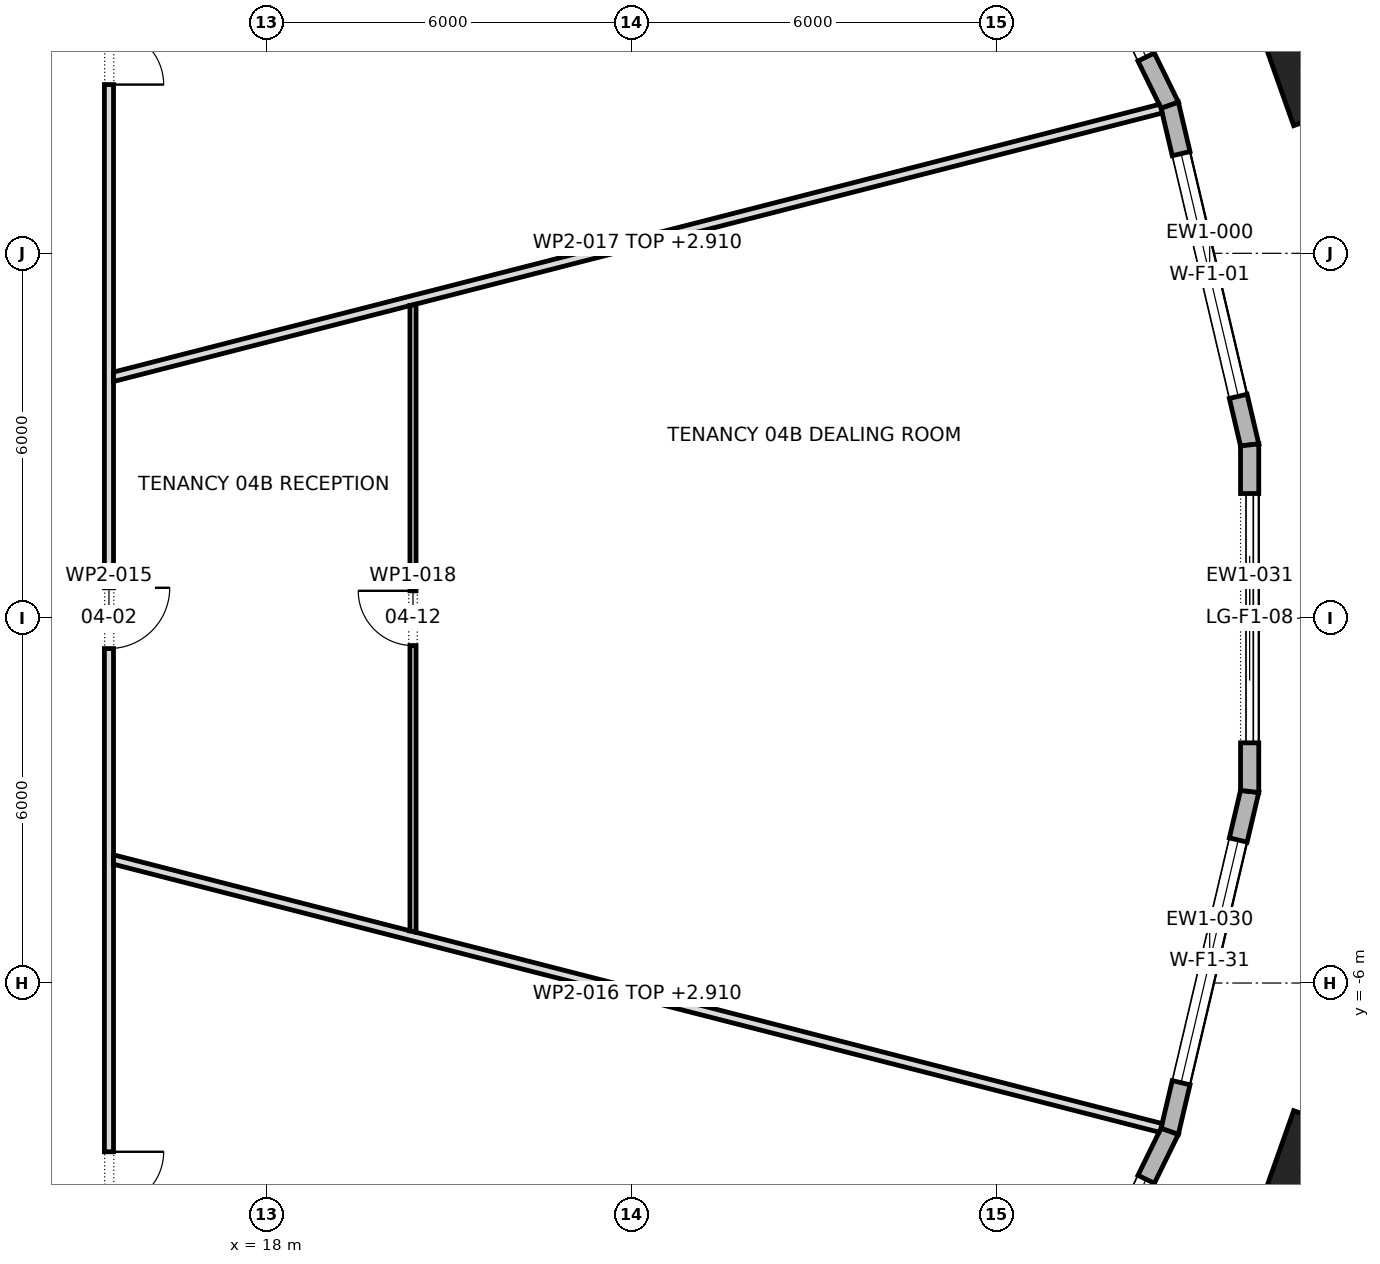
"""IFC4 building model, lengths in metres.
Left out: names, types, materials, properties, quantities, classifications, styles, units other than length and angle.
Written with IfcOpenShell. Run it as: python <this file> out.ifc"""

import sys

from ifc_helpers import new_model, si_unit, direction, frame, frame_2d, origin, origin_2d, place, context, subcontext, project, spatial, polyline, rectangle, outline, extrude, element, fill, save


model = new_model("IFC4")
c1 = context("Model", 3, precision=1e-05, world=origin(), true_north=direction((0.0, 1.0)))
c2 = subcontext(c1, "Body", "Model", "MODEL_VIEW")
j1 = project(units=[si_unit("LENGTHUNIT", "METRE"), si_unit("PLANEANGLEUNIT", "RADIAN")], contexts=[c1])
p1 = place(None, origin())
s1 = spatial("IfcSite", under=j1, at=p1, CompositionType="ELEMENT")
p2 = place(p1, origin())
s2 = spatial("IfcBuilding", under=s1, at=p2, CompositionType="ELEMENT")
p3 = place(p2, frame((0.0, 0.0, 69.7)))
s3 = spatial("IfcBuildingStorey", under=s2, at=p3, CompositionType="ELEMENT", Elevation=69.7)
for number, where, z_axis, x_axis in (
    (1, (35.054, 9.115, 0.0), (0.0, 0.0, 1.0), (-0.334, 0.943, 0.0)),
    (2, (35.054, -9.115, 0.0), (0.0, 0.0, 1.0), (0.334, 0.943, 0.0)),
):
    element("IfcColumn", number, at=place(p3, frame(where, z_axis=z_axis, x_axis=x_axis)), inside=s3, PredefinedType="COLUMN", context=c2, shape_type="SweptSolid", body=[
        extrude(rectangle(XDim=1.8, YDim=1.0, at=origin_2d()), origin(), (0.0, 0.0, 1.0), 4.2),
    ])
p4 = place(p3, frame((34.159, 2.849, 0.0), z_axis=(0.0, 0.0, 1.0), x_axis=(-0.22905355604, 0.973413821797, 0.0)))
e3 = element("IfcWall", 3, at=p4, inside=s3, PredefinedType="STANDARD", context=c2, shape_type="SweptSolid", body=[
    extrude(outline(polyline([(-0.017, -0.15), (5.758, -0.15), (5.724, 0.15), (0.017, 0.15), (-0.017, -0.15)])), origin(), (0.0, 0.0, 1.0), 3.9),
])
p5 = place(p4, frame((0.82, 0.0, 0.6)))
e4 = element("IfcOpeningElement", 4, at=p5, cuts=e3, PredefinedType="OPENING", context=c2, shape_type="SweptSolid", body=[
    extrude(rectangle(XDim=4.1, YDim=2.85, at=frame_2d((2.05, 1.425))), frame((0.0, 0.162, 0.0), z_axis=(0.0, -1.0, 0.0), x_axis=(1.0, 0.0, 0.0)), (0.0, 0.0, 1.0), 0.324),
])
p6 = place(p3, frame((32.844, 8.438, 0.0), z_axis=(0.0, 0.0, 1.0), x_axis=(-0.439949735177, 0.898022399786, 0.0)))
e5 = element("IfcWall", 5, at=p6, inside=s3, PredefinedType="STANDARD", context=c2, shape_type="SweptSolid", body=[
    extrude(outline(polyline([(-0.017, -0.15), (5.876, -0.15), (5.844, 0.15), (0.017, 0.15), (-0.017, -0.15)])), origin(), (0.0, 0.0, 1.0), 3.9),
])
p7 = place(p6, frame((0.88, 0.0, 0.6)))
e6 = element("IfcOpeningElement", 6, at=p7, cuts=e5, PredefinedType="OPENING", context=c2, shape_type="SweptSolid", body=[
    extrude(rectangle(XDim=4.1, YDim=2.85, at=frame_2d((2.05, 1.425))), frame((0.0, 0.162, 0.0), z_axis=(0.0, -1.0, 0.0), x_axis=(1.0, 0.0, 0.0)), (0.0, 0.0, 1.0), 0.324),
])
p8 = place(p3, frame((30.266, -13.7, 0.0), z_axis=(0.0, 0.0, 1.0), x_axis=(0.439949735177, 0.898022399786, 0.0)))
e7 = element("IfcWall", 7, at=p8, inside=s3, PredefinedType="STANDARD", context=c2, shape_type="SweptSolid", body=[
    extrude(outline(polyline([(-0.016, -0.15), (5.877, -0.15), (5.843, 0.15), (0.016, 0.15), (-0.016, -0.15)])), origin(), (0.0, 0.0, 1.0), 3.9),
])
p9 = place(p8, frame((0.88, 0.0, 0.6)))
e8 = element("IfcOpeningElement", 8, at=p9, cuts=e7, PredefinedType="OPENING", context=c2, shape_type="SweptSolid", body=[
    extrude(rectangle(XDim=4.1, YDim=2.85, at=frame_2d((2.05, 1.425))), frame((0.0, 0.162, 0.0), z_axis=(0.0, -1.0, 0.0), x_axis=(1.0, 0.0, 0.0)), (0.0, 0.0, 1.0), 0.324),
])
p10 = place(p3, frame((32.844, -8.438, 0.0), z_axis=(0.0, 0.0, 1.0), x_axis=(0.22905355604, 0.973413821797, 0.0)))
e9 = element("IfcWall", 9, at=p10, inside=s3, PredefinedType="STANDARD", context=c2, shape_type="SweptSolid", body=[
    extrude(outline(polyline([(-0.017, -0.15), (5.758, -0.15), (5.723, 0.15), (0.017, 0.15), (-0.017, -0.15)])), origin(), (0.0, 0.0, 1.0), 3.9),
])
p11 = place(p10, frame((0.82, 0.0, 0.6)))
e10 = element("IfcOpeningElement", 10, at=p11, cuts=e9, PredefinedType="OPENING", context=c2, shape_type="SweptSolid", body=[
    extrude(rectangle(XDim=4.1, YDim=2.85, at=frame_2d((2.05, 1.425))), frame((0.0, 0.162, 0.0), z_axis=(0.0, -1.0, 0.0), x_axis=(1.0, 0.0, 0.0)), (0.0, 0.0, 1.0), 0.324),
])
p12 = place(p3, frame((34.159, -2.849, 0.0), z_axis=(0.0, 0.0, 1.0), x_axis=(0.0, 1.0, 0.0)))
e11 = element("IfcWall", 11, at=p12, inside=s3, PredefinedType="STANDARD", context=c2, shape_type="SweptSolid", body=[
    extrude(outline(polyline([(-0.017, -0.15), (5.716, -0.15), (5.681, 0.15), (0.017, 0.15), (-0.017, -0.15)])), origin(), (0.0, 0.0, 1.0), 3.9),
])
p13 = place(p12, frame((0.799, 0.0, 0.0)))
e12 = element("IfcOpeningElement", 12, at=p13, cuts=e11, PredefinedType="OPENING", context=c2, shape_type="SweptSolid", body=[
    extrude(rectangle(XDim=4.1, YDim=3.45, at=frame_2d((2.05, 1.725))), frame((0.0, 0.162, 0.0), z_axis=(0.0, -1.0, 0.0), x_axis=(1.0, 0.0, 0.0)), (0.0, 0.0, 1.0), 0.324),
])
p14 = place(p3, frame((15.4, -15.475, 0.0), z_axis=(0.0, 0.0, 1.0), x_axis=(0.0, 1.0, 0.0)))
e13 = element("IfcWall", 13, at=p14, inside=s3, PredefinedType="PARTITIONING", context=c2, shape_type="SweptSolid", body=[
    extrude(outline(polyline([(0.0, -0.075), (1.935, -0.075), (3.869, -0.075), (5.803, -0.075), (7.738, -0.075), (9.672, -0.075), (11.606, -0.075), (13.541, -0.075), (15.475, -0.075), (17.409, -0.075), (19.344, -0.075), (21.278, -0.075), (23.212, -0.075), (25.147, -0.075), (27.081, -0.075), (29.016, -0.075), (30.95, -0.075), (30.8, 0.075), (28.885, 0.075), (26.969, 0.075), (25.053, 0.075), (23.138, 0.075), (21.222, 0.075), (19.306, 0.075), (17.391, 0.075), (15.475, 0.075), (13.56, 0.075), (11.644, 0.075), (9.728, 0.075), (7.812, 0.075), (5.897, 0.075), (3.981, 0.075), (2.066, 0.075), (0.15, 0.075), (0.0, -0.075)])), origin(), (0.0, 0.0, 1.0), 3.9),
])
p15 = place(p14, frame((4.9, 0.0, 0.0)))
e14 = element("IfcOpeningElement", 14, at=p15, cuts=e13, PredefinedType="OPENING", context=c2, shape_type="SweptSolid", body=[
    extrude(rectangle(XDim=1.8, YDim=2.1, at=frame_2d((0.9, 1.05))), frame((0.0, 0.087, 0.0), z_axis=(0.0, -1.0, 0.0), x_axis=(1.0, 0.0, 0.0)), (0.0, 0.0, 1.0), 0.174),
])
p16 = place(p14, frame((14.975, 0.0, 0.0)))
e15 = element("IfcOpeningElement", 15, at=p16, cuts=e13, PredefinedType="OPENING", context=c2, shape_type="SweptSolid", body=[
    extrude(rectangle(XDim=1.0, YDim=2.1, at=frame_2d((0.5, 1.05))), frame((0.0, 0.087, 0.0), z_axis=(0.0, -1.0, 0.0), x_axis=(1.0, 0.0, 0.0)), (0.0, 0.0, 1.0), 0.174),
])
p17 = place(p14, frame((24.25, 0.0, 0.0)))
e16 = element("IfcOpeningElement", 16, at=p17, cuts=e13, PredefinedType="OPENING", context=c2, shape_type="SweptSolid", body=[
    extrude(rectangle(XDim=1.8, YDim=2.1, at=frame_2d((0.9, 1.05))), frame((0.0, 0.087, 0.0), z_axis=(0.0, -1.0, 0.0), x_axis=(1.0, 0.0, 0.0)), (0.0, 0.0, 1.0), 0.174),
])
p18 = place(p3, frame((15.457, -3.965, 0.0), z_axis=(0.0, 0.0, 1.0), x_axis=(0.968702688789, -0.248223892349, 0.0)))
e17 = element("IfcWall", 17, at=p18, inside=s3, PredefinedType="PARTITIONING", context=c2, shape_type="SweptSolid", body=[
    extrude(outline(polyline([(0.038, -0.075), (2.01, -0.075), (3.982, -0.075), (5.955, -0.075), (7.927, -0.075), (9.899, -0.075), (11.872, -0.075), (13.844, -0.075), (15.816, -0.075), (17.788, -0.075), (17.801, -0.013), (17.801, 0.075), (15.978, 0.075), (14.155, 0.075), (12.331, 0.075), (10.508, 0.075), (8.685, 0.075), (6.861, 0.075), (5.038, 0.075), (5.032, 0.073), (5.032, 0.075), (3.355, 0.075), (1.677, 0.075), (0.0, 0.075), (0.0, 0.073), (0.038, -0.075)])), origin(), (0.0, 0.0, 1.0), 2.91),
])
p19 = place(p3, frame((15.457, 3.965, 0.0), z_axis=(0.0, 0.0, 1.0), x_axis=(0.968758808885, 0.248004778598, 0.0)))
e18 = element("IfcWall", 18, at=p19, inside=s3, PredefinedType="PARTITIONING", context=c2, shape_type="SweptSolid", body=[
    extrude(outline(polyline([(0.0, -0.075), (1.677, -0.075), (3.354, -0.075), (5.032, -0.075), (5.032, -0.075), (5.032, -0.075), (6.856, -0.075), (8.68, -0.075), (10.505, -0.075), (12.329, -0.075), (14.153, -0.075), (15.977, -0.075), (17.801, -0.075), (17.801, 0.017), (17.789, 0.075), (15.817, 0.075), (13.844, 0.075), (11.872, 0.075), (9.9, 0.075), (7.927, 0.075), (5.955, 0.075), (3.983, 0.075), (2.01, 0.075), (0.038, 0.075), (0.0, -0.073), (0.0, -0.075)])), origin(), (0.0, 0.0, 1.0), 2.91),
])
p20 = place(p3, frame((20.4, 5.165, 0.0), z_axis=(0.0, 0.0, 1.0), x_axis=(0.0, -1.0, 0.0)))
e19 = element("IfcWall", 19, at=p20, inside=s3, PredefinedType="PARTITIONING", context=c2, shape_type="SweptSolid", body=[
    extrude(outline(polyline([(0.025, -0.05), (1.739, -0.05), (3.452, -0.05), (5.166, -0.05), (6.879, -0.05), (8.593, -0.05), (10.306, -0.05), (10.332, 0.05), (10.332, 0.05), (8.61, 0.05), (6.888, 0.05), (5.166, 0.05), (3.444, 0.05), (1.722, 0.05), (0.0, 0.05), (0.0, 0.049), (0.025, -0.05)])), origin(), (0.0, 0.0, 1.0), 3.9),
])
p21 = place(p20, frame((4.715, 0.0, 0.0)))
e20 = element("IfcOpeningElement", 20, at=p21, cuts=e19, PredefinedType="OPENING", context=c2, shape_type="SweptSolid", body=[
    extrude(rectangle(XDim=0.9, YDim=2.1, at=frame_2d((0.45, 1.05))), frame((0.0, 0.062, 0.0), z_axis=(0.0, -1.0, 0.0), x_axis=(1.0, 0.0, 0.0)), (0.0, 0.0, 1.0), 0.124),
])
p22 = place(p5, origin())
e21 = element("IfcWindow", 21, at=p22, inside=s3, PartitioningType="TRIPLE_PANEL_VERTICAL", PredefinedType="WINDOW", context=c2, shape_type="SweptSolid", body=[
    extrude(rectangle(XDim=4.1, YDim=2.85, at=frame_2d((2.05, 1.425))), frame((0.0, 0.03, 0.0), z_axis=(0.0, -1.0, 0.0), x_axis=(1.0, 0.0, 0.0)), (0.0, 0.0, 1.0), 0.06),
])
fill(e4, e21)
p23 = place(p7, origin())
e22 = element("IfcWindow", 22, at=p23, inside=s3, PartitioningType="TRIPLE_PANEL_VERTICAL", PredefinedType="WINDOW", context=c2, shape_type="SweptSolid", body=[
    extrude(rectangle(XDim=4.1, YDim=2.85, at=frame_2d((2.05, 1.425))), frame((0.0, 0.03, 0.0), z_axis=(0.0, -1.0, 0.0), x_axis=(1.0, 0.0, 0.0)), (0.0, 0.0, 1.0), 0.06),
])
fill(e6, e22)
p24 = place(p9, origin())
e23 = element("IfcWindow", 23, at=p24, inside=s3, PartitioningType="TRIPLE_PANEL_VERTICAL", PredefinedType="WINDOW", context=c2, shape_type="SweptSolid", body=[
    extrude(rectangle(XDim=4.1, YDim=2.85, at=frame_2d((2.05, 1.425))), frame((0.0, 0.03, 0.0), z_axis=(0.0, -1.0, 0.0), x_axis=(1.0, 0.0, 0.0)), (0.0, 0.0, 1.0), 0.06),
])
fill(e8, e23)
p25 = place(p11, origin())
e24 = element("IfcWindow", 24, at=p25, inside=s3, PartitioningType="TRIPLE_PANEL_VERTICAL", PredefinedType="WINDOW", context=c2, shape_type="SweptSolid", body=[
    extrude(rectangle(XDim=4.1, YDim=2.85, at=frame_2d((2.05, 1.425))), frame((0.0, 0.03, 0.0), z_axis=(0.0, -1.0, 0.0), x_axis=(1.0, 0.0, 0.0)), (0.0, 0.0, 1.0), 0.06),
])
fill(e10, e24)
p26 = place(p13, origin())
e25 = element("IfcDoor", 25, at=p26, inside=s3, OperationType="DOUBLE_DOOR_SLIDING", PredefinedType="DOOR", context=c2, shape_type="SweptSolid", body=[
    extrude(rectangle(XDim=4.1, YDim=3.45, at=frame_2d((2.05, 1.725))), frame((0.0, 0.025, 0.0), z_axis=(0.0, -1.0, 0.0), x_axis=(1.0, 0.0, 0.0)), (0.0, 0.0, 1.0), 0.05),
])
fill(e12, e25)
p27 = place(p15, frame((1.8, 0.0, 0.0), z_axis=(0.0, 0.0, 1.0), x_axis=(-1.0, 0.0, 0.0)))
e26 = element("IfcDoor", 26, at=p27, inside=s3, OperationType="DOUBLE_DOOR_SINGLE_SWING", PredefinedType="DOOR", context=c2, shape_type="SweptSolid", body=[
    extrude(rectangle(XDim=1.8, YDim=2.1, at=frame_2d((0.9, 1.05))), frame((0.0, 0.025, 0.0), z_axis=(0.0, -1.0, 0.0), x_axis=(1.0, 0.0, 0.0)), (0.0, 0.0, 1.0), 0.05),
])
fill(e14, e26)
p28 = place(p16, frame((1.0, 0.0, 0.0), z_axis=(0.0, 0.0, 1.0), x_axis=(-1.0, 0.0, 0.0)))
e27 = element("IfcDoor", 27, at=p28, inside=s3, OperationType="SINGLE_SWING_RIGHT", PredefinedType="DOOR", context=c2, shape_type="SweptSolid", body=[
    extrude(rectangle(XDim=1.0, YDim=2.1, at=frame_2d((0.5, 1.05))), frame((0.0, 0.025, 0.0), z_axis=(0.0, -1.0, 0.0), x_axis=(1.0, 0.0, 0.0)), (0.0, 0.0, 1.0), 0.05),
])
fill(e15, e27)
p29 = place(p17, frame((1.8, 0.0, 0.0), z_axis=(0.0, 0.0, 1.0), x_axis=(-1.0, 0.0, 0.0)))
e28 = element("IfcDoor", 28, at=p29, inside=s3, OperationType="DOUBLE_DOOR_SINGLE_SWING", PredefinedType="DOOR", context=c2, shape_type="SweptSolid", body=[
    extrude(rectangle(XDim=1.8, YDim=2.1, at=frame_2d((0.9, 1.05))), frame((0.0, 0.025, 0.0), z_axis=(0.0, -1.0, 0.0), x_axis=(1.0, 0.0, 0.0)), (0.0, 0.0, 1.0), 0.05),
])
fill(e16, e28)
p30 = place(p21, frame((0.9, 0.0, 0.0), z_axis=(0.0, 0.0, 1.0), x_axis=(-1.0, 0.0, 0.0)))
e29 = element("IfcDoor", 29, at=p30, inside=s3, OperationType="SINGLE_SWING_LEFT", PredefinedType="DOOR", context=c2, shape_type="SweptSolid", body=[
    extrude(rectangle(XDim=0.9, YDim=2.1, at=frame_2d((0.45, 1.05))), frame((0.0, 0.025, 0.0), z_axis=(0.0, -1.0, 0.0), x_axis=(1.0, 0.0, 0.0)), (0.0, 0.0, 1.0), 0.05),
])
fill(e20, e29)
save(model, sys.argv[1])
